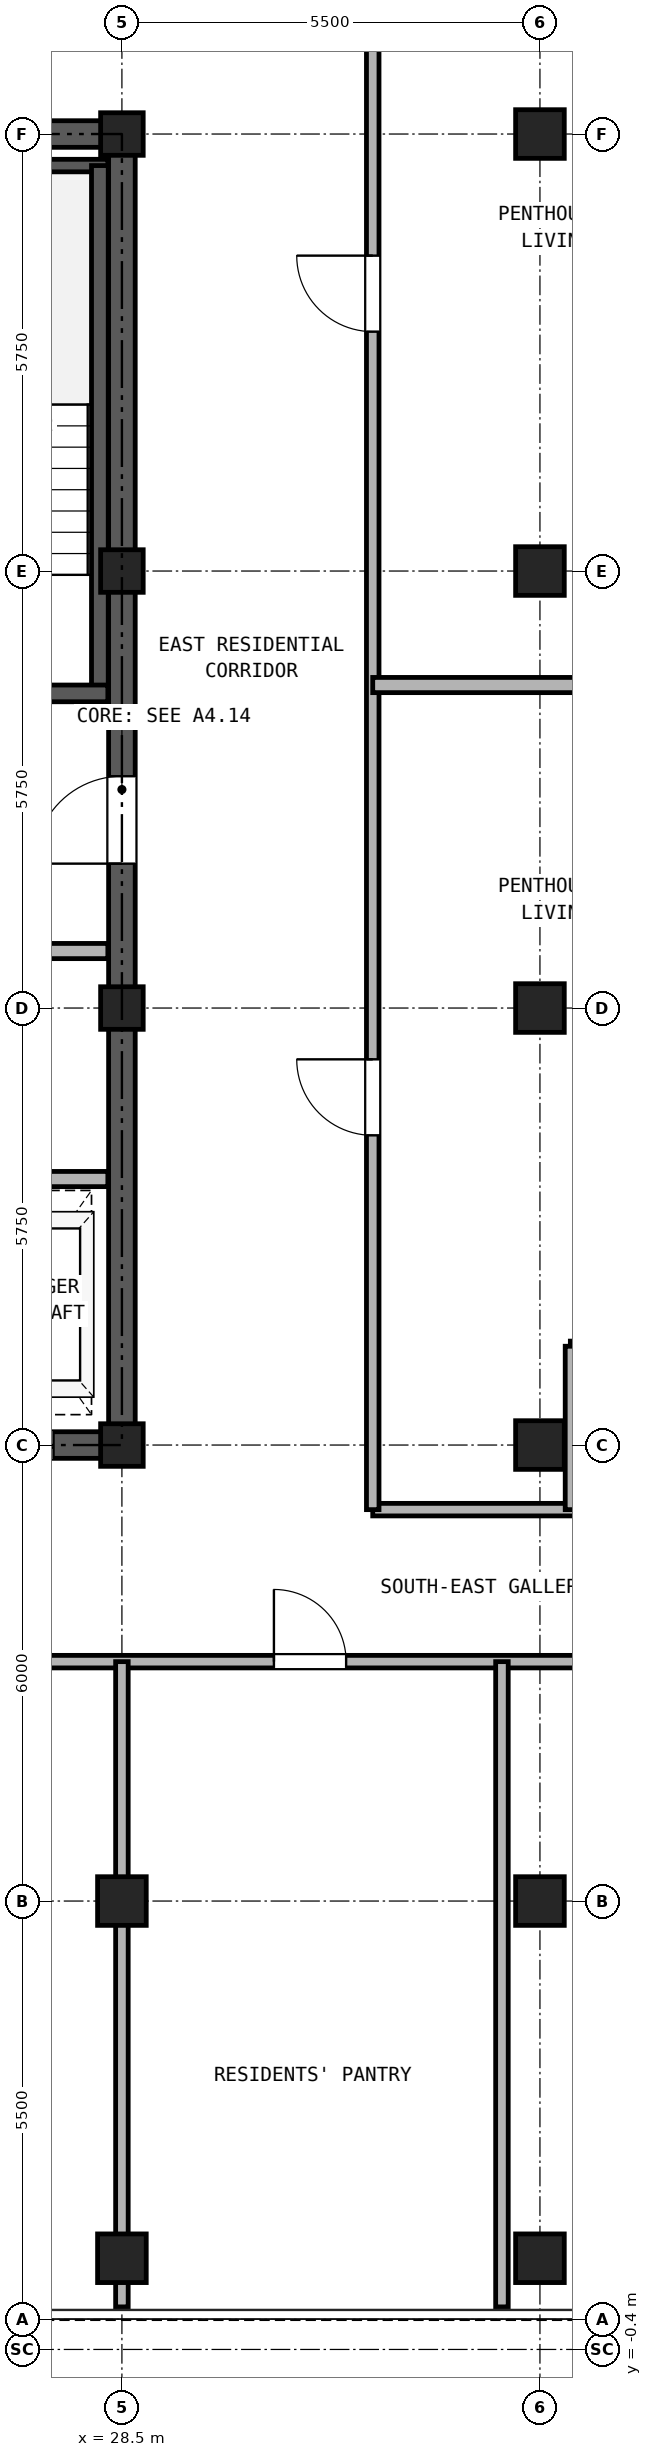
"""IFC4 building model, lengths in metres.
Left out: names, types, materials, properties, quantities, classifications, styles, units other than length and angle.
Written with IfcOpenShell. Run it as: python <this file> out.ifc"""

import sys

from ifc_helpers import new_model, si_unit, direction, frame, frame_2d, origin, origin_2d, place, context, subcontext, project, spatial, rectangle, hollow_rectangle, extrude, source, transform, mapped, element, fill, save


model = new_model("IFC4")
c1 = context("Model", 3, precision=1e-05, world=origin(), true_north=direction((0.0, 1.0)))
c2 = subcontext(c1, "Body", "Model", "MODEL_VIEW")
j1 = project(units=[si_unit("LENGTHUNIT", "METRE"), si_unit("PLANEANGLEUNIT", "RADIAN")], contexts=[c1])
p1 = place(None, origin())
s1 = spatial("IfcSite", under=j1, at=p1, CompositionType="ELEMENT")
p2 = place(p1, origin())
s2 = spatial("IfcBuilding", under=s1, at=p2, CompositionType="ELEMENT")
p3 = place(p2, frame((0.0, 0.0, 229.7)))
s3 = spatial("IfcBuildingStorey", under=s2, at=p3, CompositionType="ELEMENT", Elevation=229.7)
m1 = source(origin(), c2, "Body", "SweptSolid", [
    extrude(hollow_rectangle(XDim=0.64, YDim=0.64, WallThickness=0.035, at=origin_2d()), origin(), (0.0, 0.0, 1.0), 2.98),
])
for number, where, z_axis, x_axis in (
    (1, (28.5, 0.8, 0.0), (0.0, 0.0, 1.0), (1.0, 0.0, 0.0)),
    (2, (34.0, 0.8, 0.0), (0.0, 0.0, 1.0), (1.0, 0.0, 0.0)),
    (3, (28.5, 5.5, 0.0), (0.0, 0.0, 1.0), (1.0, 0.0, 0.0)),
):
    element("IfcColumn", number, at=place(p3, frame(where, z_axis=z_axis, x_axis=x_axis)), inside=s3, PredefinedType="COLUMN", context=c2, shape_type="MappedRepresentation", body=[
        mapped(m1, transform((0.0, 0.0, 0.0), x_axis=(1.0, 0.0, 0.0), y_axis=(0.0, 1.0, 0.0), z_axis=(0.0, 0.0, 1.0), scale=1.0)),
    ])
m2 = source(origin(), c2, "Body", "SweptSolid", [
    extrude(hollow_rectangle(XDim=0.56, YDim=0.56, WallThickness=0.03, at=origin_2d()), origin(), (0.0, 0.0, 1.0), 2.98),
])
for number, where, z_axis, x_axis in (
    (4, (28.5, 11.5, 0.0), (0.0, 0.0, 1.0), (1.0, 0.0, 0.0)),
    (5, (28.5, 17.25, 0.0), (0.0, 0.0, 1.0), (1.0, 0.0, 0.0)),
    (6, (28.5, 23.0, 0.0), (0.0, 0.0, 1.0), (1.0, 0.0, 0.0)),
    (7, (28.5, 28.75, 0.0), (0.0, 0.0, 1.0), (1.0, 0.0, 0.0)),
):
    element("IfcColumn", number, at=place(p3, frame(where, z_axis=z_axis, x_axis=x_axis)), inside=s3, PredefinedType="COLUMN", context=c2, shape_type="MappedRepresentation", body=[
        mapped(m2, transform((0.0, 0.0, 0.0), x_axis=(1.0, 0.0, 0.0), y_axis=(0.0, 1.0, 0.0), z_axis=(0.0, 0.0, 1.0), scale=1.0)),
    ])
for number, where, z_axis, x_axis in (
    (8, (34.0, 5.5, 0.0), (0.0, 0.0, 1.0), (1.0, 0.0, 0.0)),
    (9, (34.0, 11.5, 0.0), (0.0, 0.0, 1.0), (1.0, 0.0, 0.0)),
    (10, (34.0, 17.25, 0.0), (0.0, 0.0, 1.0), (1.0, 0.0, 0.0)),
    (11, (34.0, 23.0, 0.0), (0.0, 0.0, 1.0), (1.0, 0.0, 0.0)),
    (12, (34.0, 28.75, 0.0), (0.0, 0.0, 1.0), (1.0, 0.0, 0.0)),
):
    element("IfcColumn", number, at=place(p3, frame(where, z_axis=z_axis, x_axis=x_axis)), inside=s3, PredefinedType="COLUMN", context=c2, shape_type="MappedRepresentation", body=[
        mapped(m1, transform((0.0, 0.0, 0.0), x_axis=(1.0, 0.0, 0.0), y_axis=(0.0, 1.0, 0.0), z_axis=(0.0, 0.0, 1.0), scale=1.0)),
    ])
p4 = place(p3, frame((18.325, 11.5, 0.0), z_axis=(0.0, 0.0, 1.0), x_axis=(1.0, 0.0, 0.0)))
e13 = element("IfcWall", 13, at=p4, inside=s3, PredefinedType="SHEAR", context=c2, shape_type="SweptSolid", body=[
    extrude(rectangle(XDim=10.35, YDim=0.35, at=frame_2d((5.175, 0.0))), origin(), (0.0, 0.0, 1.0), 2.98),
])
p5 = place(p4, frame((1.775, 0.0, 0.0)))
e14 = element("IfcOpeningElement", 14, at=p5, cuts=e13, PredefinedType="OPENING", context=c2, shape_type="SweptSolid", body=[
    extrude(rectangle(XDim=0.95, YDim=2.15, at=frame_2d((0.475, 1.075))), frame((0.0, 0.185, 0.0), z_axis=(0.0, -1.0, 0.0), x_axis=(1.0, 0.0, 0.0)), (0.0, 0.0, 1.0), 0.37),
])
p6 = place(p4, frame((5.275, 0.0, 0.0)))
e15 = element("IfcOpeningElement", 15, at=p6, cuts=e13, PredefinedType="OPENING", context=c2, shape_type="SweptSolid", body=[
    extrude(rectangle(XDim=0.95, YDim=2.15, at=frame_2d((0.475, 1.075))), frame((0.0, 0.185, 0.0), z_axis=(0.0, -1.0, 0.0), x_axis=(1.0, 0.0, 0.0)), (0.0, 0.0, 1.0), 0.37),
])
p7 = place(p4, frame((8.175, 0.0, 0.0)))
e16 = element("IfcOpeningElement", 16, at=p7, cuts=e13, PredefinedType="OPENING", context=c2, shape_type="SweptSolid", body=[
    extrude(rectangle(XDim=1.1, YDim=2.25, at=frame_2d((0.55, 1.125))), frame((0.0, 0.185, 0.0), z_axis=(0.0, -1.0, 0.0), x_axis=(1.0, 0.0, 0.0)), (0.0, 0.0, 1.0), 0.37),
])
p8 = place(p3, frame((18.325, 28.75, 0.0), z_axis=(0.0, 0.0, 1.0), x_axis=(1.0, 0.0, 0.0)))
e17 = element("IfcWall", 17, at=p8, inside=s3, PredefinedType="SHEAR", context=c2, shape_type="SweptSolid", body=[
    extrude(rectangle(XDim=10.35, YDim=0.35, at=frame_2d((5.175, 0.0))), origin(), (0.0, 0.0, 1.0), 2.98),
])
p9 = place(p8, frame((4.055, 0.0, 0.0)))
e18 = element("IfcOpeningElement", 18, at=p9, cuts=e17, PredefinedType="OPENING", context=c2, shape_type="SweptSolid", body=[
    extrude(rectangle(XDim=0.9, YDim=2.05, at=frame_2d((0.45, 1.025))), frame((0.0, 0.185, 0.0), z_axis=(0.0, -1.0, 0.0), x_axis=(1.0, 0.0, 0.0)), (0.0, 0.0, 1.0), 0.37),
])
p10 = place(p8, frame((5.595, 0.0, 0.0)))
e19 = element("IfcOpeningElement", 19, at=p10, cuts=e17, PredefinedType="OPENING", context=c2, shape_type="SweptSolid", body=[
    extrude(rectangle(XDim=0.9, YDim=2.05, at=frame_2d((0.45, 1.025))), frame((0.0, 0.185, 0.0), z_axis=(0.0, -1.0, 0.0), x_axis=(1.0, 0.0, 0.0)), (0.0, 0.0, 1.0), 0.37),
])
p11 = place(p3, frame((28.5, 11.675, 0.0), z_axis=(0.0, 0.0, 1.0), x_axis=(0.0, 1.0, 0.0)))
e20 = element("IfcWall", 20, at=p11, inside=s3, PredefinedType="SHEAR", context=c2, shape_type="SweptSolid", body=[
    extrude(rectangle(XDim=16.9, YDim=0.35, at=frame_2d((8.45, 0.0))), origin(), (0.0, 0.0, 1.0), 2.98),
])
p12 = place(p11, frame((7.475, 0.0, 0.0)))
e21 = element("IfcOpeningElement", 21, at=p12, cuts=e20, PredefinedType="OPENING", context=c2, shape_type="SweptSolid", body=[
    extrude(rectangle(XDim=1.15, YDim=2.2, at=frame_2d((0.575, 1.1))), frame((0.0, 0.185, 0.0), z_axis=(0.0, -1.0, 0.0), x_axis=(1.0, 0.0, 0.0)), (0.0, 0.0, 1.0), 0.37),
])
p13 = place(p3, frame((25.13, 28.335, 0.0), z_axis=(0.0, 0.0, 1.0), x_axis=(1.0, 0.0, 0.0)))
e22 = element("IfcWall", 22, at=p13, inside=s3, PredefinedType="PARTITIONING", context=c2, shape_type="SweptSolid", body=[
    extrude(rectangle(XDim=3.185, YDim=0.165, at=frame_2d((1.593, 0.0))), origin(), (0.0, 0.0, 1.0), 2.98),
])
p14 = place(p3, frame((28.21, 21.39, 0.0), z_axis=(0.0, 0.0, 1.0), x_axis=(0.0, 1.0, 0.0)))
e23 = element("IfcWall", 23, at=p14, inside=s3, PredefinedType="SOLIDWALL", context=c2, shape_type="SweptSolid", body=[
    extrude(rectangle(XDim=6.945, YDim=0.22, at=frame_2d((3.473, 0.0))), origin(), (0.0, 0.0, 1.0), 2.98),
])
p15 = place(p3, frame((25.13, 21.39, 0.0), z_axis=(0.0, 0.0, 1.0), x_axis=(1.0, 0.0, 0.0)))
e24 = element("IfcWall", 24, at=p15, inside=s3, PredefinedType="SOLIDWALL", context=c2, shape_type="SweptSolid", body=[
    extrude(rectangle(XDim=3.185, YDim=0.22, at=frame_2d((1.593, 0.0))), origin(), (0.0, 0.0, 1.0), 2.98),
])
p16 = place(p15, frame((0.92, 0.0, 0.0)))
e25 = element("IfcOpeningElement", 25, at=p16, cuts=e24, PredefinedType="OPENING", context=c2, shape_type="SweptSolid", body=[
    extrude(rectangle(XDim=1.15, YDim=2.2, at=frame_2d((0.575, 1.1))), frame((0.0, 0.12, 0.0), z_axis=(0.0, -1.0, 0.0), x_axis=(1.0, 0.0, 0.0)), (0.0, 0.0, 1.0), 0.24),
])
p17 = place(p3, frame((18.685, 18.0, 0.0), z_axis=(0.0, 0.0, 1.0), x_axis=(1.0, 0.0, 0.0)))
e26 = element("IfcWall", 26, at=p17, inside=s3, PredefinedType="PARTITIONING", context=c2, shape_type="SweptSolid", body=[
    extrude(rectangle(XDim=9.63, YDim=0.2, at=frame_2d((4.815, 0.0))), origin(), (0.0, 0.0, 1.0), 2.98),
])
p18 = place(p17, frame((0.565, 0.0, 0.0)))
e27 = element("IfcOpeningElement", 27, at=p18, cuts=e26, PredefinedType="OPENING", context=c2, shape_type="SweptSolid", body=[
    extrude(rectangle(XDim=1.3, YDim=2.3, at=frame_2d((0.65, 1.15))), frame((0.0, 0.11, 0.0), z_axis=(0.0, -1.0, 0.0), x_axis=(1.0, 0.0, 0.0)), (0.0, 0.0, 1.0), 0.22),
])
p19 = place(p17, frame((2.665, 0.0, 0.0)))
e28 = element("IfcOpeningElement", 28, at=p19, cuts=e26, PredefinedType="OPENING", context=c2, shape_type="SweptSolid", body=[
    extrude(rectangle(XDim=1.3, YDim=2.3, at=frame_2d((0.65, 1.15))), frame((0.0, 0.11, 0.0), z_axis=(0.0, -1.0, 0.0), x_axis=(1.0, 0.0, 0.0)), (0.0, 0.0, 1.0), 0.22),
])
p20 = place(p17, frame((7.165, 0.0, 0.0)))
e29 = element("IfcOpeningElement", 29, at=p20, cuts=e26, PredefinedType="OPENING", context=c2, shape_type="SweptSolid", body=[
    extrude(rectangle(XDim=1.0, YDim=2.15, at=frame_2d((0.5, 1.075))), frame((0.0, 0.11, 0.0), z_axis=(0.0, -1.0, 0.0), x_axis=(1.0, 0.0, 0.0)), (0.0, 0.0, 1.0), 0.22),
])
p21 = place(p3, frame((18.685, 15.0, 0.0), z_axis=(0.0, 0.0, 1.0), x_axis=(1.0, 0.0, 0.0)))
e30 = element("IfcWall", 30, at=p21, inside=s3, PredefinedType="PARTITIONING", context=c2, shape_type="SweptSolid", body=[
    extrude(rectangle(XDim=9.63, YDim=0.2, at=frame_2d((4.815, 0.0))), origin(), (0.0, 0.0, 1.0), 2.98),
])
p22 = place(p3, frame((5.36, 8.65, 0.0), z_axis=(0.0, 0.0, 1.0), x_axis=(1.0, 0.0, 0.0)))
e31 = element("IfcWall", 31, at=p22, inside=s3, PredefinedType="PARTITIONING", context=c2, shape_type="SweptSolid", body=[
    extrude(rectangle(XDim=36.28, YDim=0.165, at=frame_2d((18.14, 0.0))), origin(), (0.0, 0.0, 1.0), 2.655),
])
p23 = place(p22, frame((8.17, 0.0, 0.0)))
e32 = element("IfcOpeningElement", 32, at=p23, cuts=e31, PredefinedType="OPENING", context=c2, shape_type="SweptSolid", body=[
    extrude(rectangle(XDim=0.95, YDim=2.15, at=frame_2d((0.475, 1.075))), frame((0.0, 0.093, 0.0), z_axis=(0.0, -1.0, 0.0), x_axis=(1.0, 0.0, 0.0)), (0.0, 0.0, 1.0), 0.185),
])
p24 = place(p22, frame((18.14, 0.0, 0.0)))
e33 = element("IfcOpeningElement", 33, at=p24, cuts=e31, PredefinedType="OPENING", context=c2, shape_type="SweptSolid", body=[
    extrude(rectangle(XDim=0.95, YDim=2.15, at=frame_2d((0.475, 1.075))), frame((0.0, 0.093, 0.0), z_axis=(0.0, -1.0, 0.0), x_axis=(1.0, 0.0, 0.0)), (0.0, 0.0, 1.0), 0.185),
])
p25 = place(p22, frame((25.14, 0.0, 0.0)))
e34 = element("IfcOpeningElement", 34, at=p25, cuts=e31, PredefinedType="OPENING", context=c2, shape_type="SweptSolid", body=[
    extrude(rectangle(XDim=0.95, YDim=2.15, at=frame_2d((0.475, 1.075))), frame((0.0, 0.093, 0.0), z_axis=(0.0, -1.0, 0.0), x_axis=(1.0, 0.0, 0.0)), (0.0, 0.0, 1.0), 0.185),
])
p26 = place(p22, frame((29.99, 0.0, 0.0)))
e35 = element("IfcOpeningElement", 35, at=p26, cuts=e31, PredefinedType="OPENING", context=c2, shape_type="SweptSolid", body=[
    extrude(rectangle(XDim=0.95, YDim=2.15, at=frame_2d((0.475, 1.075))), frame((0.0, 0.093, 0.0), z_axis=(0.0, -1.0, 0.0), x_axis=(1.0, 0.0, 0.0)), (0.0, 0.0, 1.0), 0.185),
])
p27 = place(p3, frame((31.8, 10.65, 0.0), z_axis=(0.0, 0.0, 1.0), x_axis=(1.0, 0.0, 0.0)))
e36 = element("IfcWall", 36, at=p27, inside=s3, PredefinedType="PARTITIONING", context=c2, shape_type="SweptSolid", body=[
    extrude(rectangle(XDim=6.4, YDim=0.165, at=frame_2d((3.2, 0.0))), origin(), (0.0, 0.0, 1.0), 2.98),
])
p28 = place(p3, frame((31.8, 10.65, 0.0), z_axis=(0.0, 0.0, 1.0), x_axis=(0.0, 1.0, 0.0)))
e37 = element("IfcWall", 37, at=p28, inside=s3, PredefinedType="PARTITIONING", context=c2, shape_type="SweptSolid", body=[
    extrude(rectangle(XDim=24.49, YDim=0.165, at=frame_2d((12.245, 0.0))), origin(), (0.0, 0.0, 1.0), 2.98),
])
p29 = place(p28, frame((4.925, 0.0, 0.0)))
e38 = element("IfcOpeningElement", 38, at=p29, cuts=e37, PredefinedType="OPENING", context=c2, shape_type="SweptSolid", body=[
    extrude(rectangle(XDim=1.0, YDim=2.15, at=frame_2d((0.5, 1.075))), frame((0.0, 0.093, 0.0), z_axis=(0.0, -1.0, 0.0), x_axis=(1.0, 0.0, 0.0)), (0.0, 0.0, 1.0), 0.185),
])
p30 = place(p28, frame((15.5, 0.0, 0.0)))
e39 = element("IfcOpeningElement", 39, at=p30, cuts=e37, PredefinedType="OPENING", context=c2, shape_type="SweptSolid", body=[
    extrude(rectangle(XDim=1.0, YDim=2.15, at=frame_2d((0.5, 1.075))), frame((0.0, 0.093, 0.0), z_axis=(0.0, -1.0, 0.0), x_axis=(1.0, 0.0, 0.0)), (0.0, 0.0, 1.0), 0.185),
])
p31 = place(p3, frame((28.5, 0.16, 0.0), z_axis=(0.0, 0.0, 1.0), x_axis=(0.0, 1.0, 0.0)))
e40 = element("IfcWall", 40, at=p31, inside=s3, PredefinedType="PARTITIONING", context=c2, shape_type="SweptSolid", body=[
    extrude(rectangle(XDim=8.49, YDim=0.165, at=frame_2d((4.245, 0.0))), origin(), (0.0, 0.0, 1.0), 2.428),
])
p32 = place(p3, frame((33.5, 0.16, 0.0), z_axis=(0.0, 0.0, 1.0), x_axis=(0.0, 1.0, 0.0)))
e41 = element("IfcWall", 41, at=p32, inside=s3, PredefinedType="PARTITIONING", context=c2, shape_type="SweptSolid", body=[
    extrude(rectangle(XDim=8.49, YDim=0.165, at=frame_2d((4.245, 0.0))), origin(), (0.0, 0.0, 1.0), 2.98),
])
p33 = place(p3, frame((34.4, 12.8, 0.0), z_axis=(0.0, 0.0, 1.0), x_axis=(1.0, 0.0, 0.0)))
e42 = element("IfcWall", 42, at=p33, inside=s3, PredefinedType="PARTITIONING", context=c2, shape_type="SweptSolid", body=[
    extrude(rectangle(XDim=1.85, YDim=0.135, at=frame_2d((0.925, 0.0))), origin(), (0.0, 0.0, 1.0), 2.98),
])
p34 = place(p33, frame((0.445, 0.0, 0.0)))
e43 = element("IfcOpeningElement", 43, at=p34, cuts=e42, PredefinedType="OPENING", context=c2, shape_type="SweptSolid", body=[
    extrude(rectangle(XDim=0.95, YDim=2.15, at=frame_2d((0.475, 1.075))), frame((0.0, 0.077, 0.0), z_axis=(0.0, -1.0, 0.0), x_axis=(1.0, 0.0, 0.0)), (0.0, 0.0, 1.0), 0.155),
])
p35 = place(p3, frame((34.4, 10.65, 0.0), z_axis=(0.0, 0.0, 1.0), x_axis=(0.0, 1.0, 0.0)))
e44 = element("IfcWall", 44, at=p35, inside=s3, PredefinedType="PARTITIONING", context=c2, shape_type="SweptSolid", body=[
    extrude(rectangle(XDim=2.15, YDim=0.135, at=frame_2d((1.075, 0.0))), origin(), (0.0, 0.0, 1.0), 2.98),
])
p36 = place(p3, frame((31.8, 21.5, 0.0), z_axis=(0.0, 0.0, 1.0), x_axis=(1.0, 0.0, 0.0)))
e45 = element("IfcWall", 45, at=p36, inside=s3, PredefinedType="PARTITIONING", context=c2, shape_type="SweptSolid", body=[
    extrude(rectangle(XDim=9.84, YDim=0.2, at=frame_2d((4.92, 0.0))), origin(), (0.0, 0.0, 1.0), 2.98),
])
p37 = place(p12, origin())
e46 = element("IfcDoor", 46, at=p37, inside=s3, OperationType="SINGLE_SWING_LEFT", PredefinedType="DOOR", context=c2, shape_type="SweptSolid", body=[
    extrude(rectangle(XDim=1.15, YDim=2.2, at=frame_2d((0.575, 1.1))), frame((0.0, 0.025, 0.0), z_axis=(0.0, -1.0, 0.0), x_axis=(1.0, 0.0, 0.0)), (0.0, 0.0, 1.0), 0.05),
])
fill(e21, e46)
p38 = place(p7, frame((1.1, 0.0, 0.0), z_axis=(0.0, 0.0, 1.0), x_axis=(-1.0, 0.0, 0.0)))
e47 = element("IfcDoor", 47, at=p38, inside=s3, OperationType="DOUBLE_DOOR_SLIDING", PredefinedType="DOOR", context=c2, shape_type="SweptSolid", body=[
    extrude(rectangle(XDim=1.1, YDim=2.25, at=frame_2d((0.55, 1.125))), frame((0.0, 0.025, 0.0), z_axis=(0.0, -1.0, 0.0), x_axis=(1.0, 0.0, 0.0)), (0.0, 0.0, 1.0), 0.05),
])
fill(e16, e47)
p39 = place(p25, frame((0.95, 0.0, 0.0), z_axis=(0.0, 0.0, 1.0), x_axis=(-1.0, 0.0, 0.0)))
e48 = element("IfcDoor", 48, at=p39, inside=s3, OperationType="SINGLE_SWING_LEFT", PredefinedType="DOOR", context=c2, shape_type="SweptSolid", body=[
    extrude(rectangle(XDim=0.95, YDim=2.15, at=frame_2d((0.475, 1.075))), frame((0.0, 0.025, 0.0), z_axis=(0.0, -1.0, 0.0), x_axis=(1.0, 0.0, 0.0)), (0.0, 0.0, 1.0), 0.05),
])
fill(e34, e48)
p40 = place(p29, frame((1.0, 0.0, 0.0), z_axis=(0.0, 0.0, 1.0), x_axis=(-1.0, 0.0, 0.0)))
e49 = element("IfcDoor", 49, at=p40, inside=s3, OperationType="SINGLE_SWING_RIGHT", PredefinedType="DOOR", context=c2, shape_type="SweptSolid", body=[
    extrude(rectangle(XDim=1.0, YDim=2.15, at=frame_2d((0.5, 1.075))), frame((0.0, 0.025, 0.0), z_axis=(0.0, -1.0, 0.0), x_axis=(1.0, 0.0, 0.0)), (0.0, 0.0, 1.0), 0.05),
])
fill(e38, e49)
p41 = place(p30, frame((1.0, 0.0, 0.0), z_axis=(0.0, 0.0, 1.0), x_axis=(-1.0, 0.0, 0.0)))
e50 = element("IfcDoor", 50, at=p41, inside=s3, OperationType="SINGLE_SWING_RIGHT", PredefinedType="DOOR", context=c2, shape_type="SweptSolid", body=[
    extrude(rectangle(XDim=1.0, YDim=2.15, at=frame_2d((0.5, 1.075))), frame((0.0, 0.025, 0.0), z_axis=(0.0, -1.0, 0.0), x_axis=(1.0, 0.0, 0.0)), (0.0, 0.0, 1.0), 0.05),
])
fill(e39, e50)
save(model, sys.argv[1])
